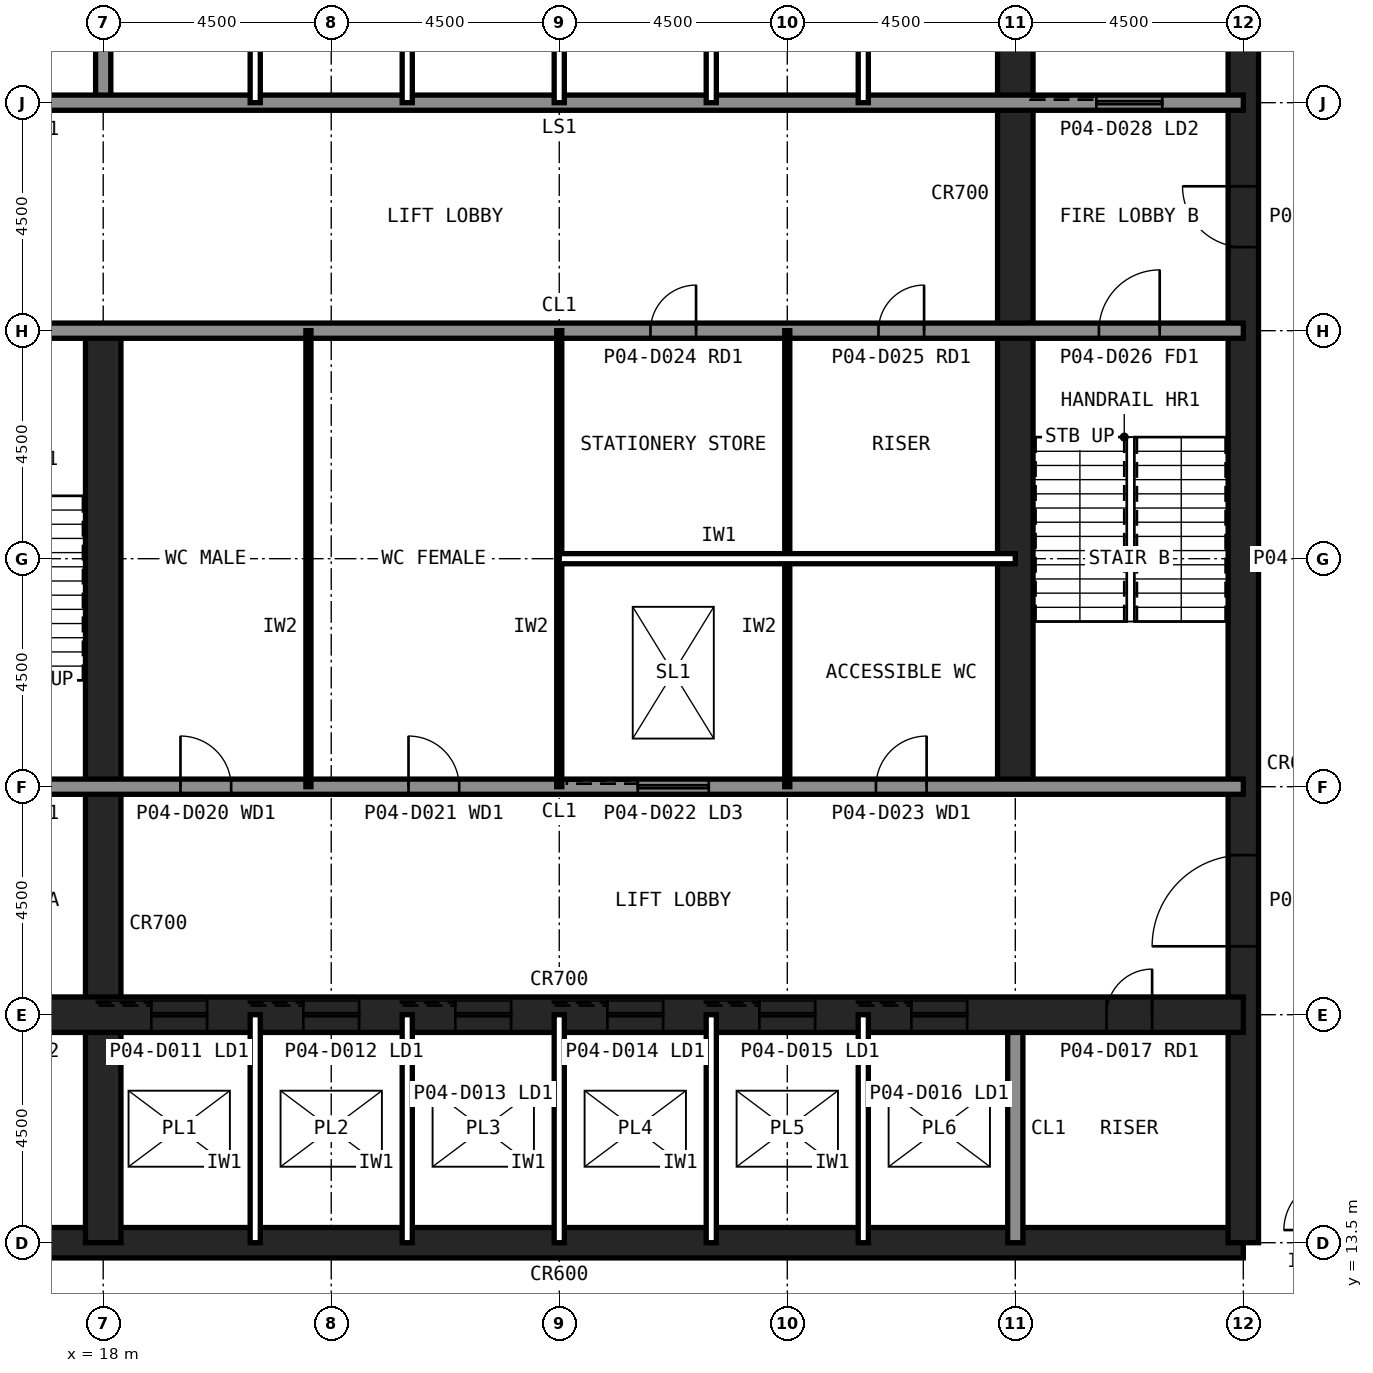
"""IFC4 building model, lengths in metres.
Left out: names, types, materials, properties, quantities, classifications, styles, units other than length and angle.
Written with IfcOpenShell. Run it as: python <this file> out.ifc"""

import sys

from ifc_helpers import new_model, si_unit, direction, frame, frame_2d, origin, place, context, subcontext, project, spatial, rectangle, extrude, element, fill, save


model = new_model("IFC4")
c1 = context("Model", 3, precision=1e-05, world=origin(), true_north=direction((0.0, 1.0)))
c2 = subcontext(c1, "Body", "Model", "MODEL_VIEW")
j1 = project(units=[si_unit("LENGTHUNIT", "METRE"), si_unit("PLANEANGLEUNIT", "RADIAN")], contexts=[c1])
p1 = place(None, origin())
s1 = spatial("IfcSite", under=j1, at=p1, CompositionType="ELEMENT")
p2 = place(p1, origin())
s2 = spatial("IfcBuilding", under=s1, at=p2, CompositionType="ELEMENT")
p3 = place(p2, frame((0.0, 0.0, 18.0)))
s3 = spatial("IfcBuildingStorey", under=s2, at=p3, CompositionType="ELEMENT", Elevation=18.0)
p4 = place(p3, frame((13.5, 13.5, 0.0), z_axis=(0.0, 0.0, 1.0), x_axis=(1.0, 0.0, 0.0)))
e1 = element("IfcWall", 1, at=p4, inside=s3, PredefinedType="SHEAR", context=c2, shape_type="SweptSolid", body=[
    extrude(rectangle(XDim=27.0, YDim=0.6, at=frame_2d((13.5, 0.0))), origin(), (0.0, 0.0, 1.0), 5.0),
])
p5 = place(p3, frame((40.5, 13.5, 0.0), z_axis=(0.0, 0.0, 1.0), x_axis=(0.0, 1.0, 0.0)))
e2 = element("IfcWall", 2, at=p5, inside=s3, PredefinedType="SHEAR", context=c2, shape_type="SweptSolid", body=[
    extrude(rectangle(XDim=27.0, YDim=0.6, at=frame_2d((13.5, 0.0))), origin(), (0.0, 0.0, 1.0), 5.0),
])
p6 = place(p5, frame((5.85, 0.0, 0.0)))
e3 = element("IfcOpeningElement", 3, at=p6, cuts=e2, PredefinedType="OPENING", context=c2, shape_type="SweptSolid", body=[
    extrude(rectangle(XDim=1.8, YDim=2.1, at=frame_2d((0.9, 1.05))), frame((0.0, 0.31, 0.0), z_axis=(0.0, -1.0, 0.0), x_axis=(1.0, 0.0, 0.0)), (0.0, 0.0, 1.0), 0.62),
])
p7 = place(p5, frame((19.65, 0.0, 0.0)))
e4 = element("IfcOpeningElement", 4, at=p7, cuts=e2, PredefinedType="OPENING", context=c2, shape_type="SweptSolid", body=[
    extrude(rectangle(XDim=1.2, YDim=2.1, at=frame_2d((0.6, 1.05))), frame((0.0, 0.31, 0.0), z_axis=(0.0, -1.0, 0.0), x_axis=(1.0, 0.0, 0.0)), (0.0, 0.0, 1.0), 0.62),
])
p8 = place(p3, frame((18.0, 13.5, 0.0), z_axis=(0.0, 0.0, 1.0), x_axis=(0.0, 1.0, 0.0)))
e5 = element("IfcWall", 5, at=p8, inside=s3, PredefinedType="SHEAR", context=c2, shape_type="SweptSolid", body=[
    extrude(rectangle(XDim=18.0, YDim=0.7, at=frame_2d((9.0, 0.0))), origin(), (0.0, 0.0, 1.0), 5.0),
])
for number, where, z_axis, x_axis in (
    (6, (18.0, 36.0, 0.0), (0.0, 0.0, 1.0), (0.0, 1.0, 0.0)),
    (7, (36.0, 13.5, 0.0), (0.0, 0.0, 1.0), (0.0, 1.0, 0.0)),
):
    element("IfcWall", number, at=place(p3, frame(where, z_axis=z_axis, x_axis=x_axis)), inside=s3, PredefinedType="SOLIDWALL", context=c2, shape_type="SweptSolid", body=[
        extrude(rectangle(XDim=4.5, YDim=0.3, at=frame_2d((2.25, 0.0))), origin(), (0.0, 0.0, 1.0), 4.8),
    ])
p9 = place(p3, frame((36.0, 22.5, 0.0), z_axis=(0.0, 0.0, 1.0), x_axis=(0.0, 1.0, 0.0)))
e8 = element("IfcWall", 8, at=p9, inside=s3, PredefinedType="SHEAR", context=c2, shape_type="SweptSolid", body=[
    extrude(rectangle(XDim=18.0, YDim=0.7, at=frame_2d((9.0, 0.0))), origin(), (0.0, 0.0, 1.0), 5.0),
])
p10 = place(p3, frame((13.5, 18.0, 0.0), z_axis=(0.0, 0.0, 1.0), x_axis=(1.0, 0.0, 0.0)))
e9 = element("IfcWall", 9, at=p10, inside=s3, PredefinedType="SHEAR", context=c2, shape_type="SweptSolid", body=[
    extrude(rectangle(XDim=27.0, YDim=0.7, at=frame_2d((13.5, 0.0))), origin(), (0.0, 0.0, 1.0), 5.0),
])
p11 = place(p10, frame((24.3, 0.0, 0.0)))
e10 = element("IfcOpeningElement", 10, at=p11, cuts=e9, PredefinedType="OPENING", context=c2, shape_type="SweptSolid", body=[
    extrude(rectangle(XDim=0.9, YDim=2.1, at=frame_2d((0.45, 1.05))), frame((0.0, 0.36, 0.0), z_axis=(0.0, -1.0, 0.0), x_axis=(1.0, 0.0, 0.0)), (0.0, 0.0, 1.0), 0.72),
])
p12 = place(p10, frame((5.45, 0.0, 0.0)))
e11 = element("IfcOpeningElement", 11, at=p12, cuts=e9, PredefinedType="OPENING", context=c2, shape_type="SweptSolid", body=[
    extrude(rectangle(XDim=1.1, YDim=2.1, at=frame_2d((0.55, 1.05))), frame((0.0, 0.36, 0.0), z_axis=(0.0, -1.0, 0.0), x_axis=(1.0, 0.0, 0.0)), (0.0, 0.0, 1.0), 0.72),
])
p13 = place(p10, frame((8.45, 0.0, 0.0)))
e12 = element("IfcOpeningElement", 12, at=p13, cuts=e9, PredefinedType="OPENING", context=c2, shape_type="SweptSolid", body=[
    extrude(rectangle(XDim=1.1, YDim=2.1, at=frame_2d((0.55, 1.05))), frame((0.0, 0.36, 0.0), z_axis=(0.0, -1.0, 0.0), x_axis=(1.0, 0.0, 0.0)), (0.0, 0.0, 1.0), 0.72),
])
p14 = place(p10, frame((11.45, 0.0, 0.0)))
e13 = element("IfcOpeningElement", 13, at=p14, cuts=e9, PredefinedType="OPENING", context=c2, shape_type="SweptSolid", body=[
    extrude(rectangle(XDim=1.1, YDim=2.1, at=frame_2d((0.55, 1.05))), frame((0.0, 0.36, 0.0), z_axis=(0.0, -1.0, 0.0), x_axis=(1.0, 0.0, 0.0)), (0.0, 0.0, 1.0), 0.72),
])
p15 = place(p10, frame((14.45, 0.0, 0.0)))
e14 = element("IfcOpeningElement", 14, at=p15, cuts=e9, PredefinedType="OPENING", context=c2, shape_type="SweptSolid", body=[
    extrude(rectangle(XDim=1.1, YDim=2.1, at=frame_2d((0.55, 1.05))), frame((0.0, 0.36, 0.0), z_axis=(0.0, -1.0, 0.0), x_axis=(1.0, 0.0, 0.0)), (0.0, 0.0, 1.0), 0.72),
])
p16 = place(p10, frame((17.45, 0.0, 0.0)))
e15 = element("IfcOpeningElement", 15, at=p16, cuts=e9, PredefinedType="OPENING", context=c2, shape_type="SweptSolid", body=[
    extrude(rectangle(XDim=1.1, YDim=2.1, at=frame_2d((0.55, 1.05))), frame((0.0, 0.36, 0.0), z_axis=(0.0, -1.0, 0.0), x_axis=(1.0, 0.0, 0.0)), (0.0, 0.0, 1.0), 0.72),
])
p17 = place(p10, frame((20.45, 0.0, 0.0)))
e16 = element("IfcOpeningElement", 16, at=p17, cuts=e9, PredefinedType="OPENING", context=c2, shape_type="SweptSolid", body=[
    extrude(rectangle(XDim=1.1, YDim=2.1, at=frame_2d((0.55, 1.05))), frame((0.0, 0.36, 0.0), z_axis=(0.0, -1.0, 0.0), x_axis=(1.0, 0.0, 0.0)), (0.0, 0.0, 1.0), 0.72),
])
p18 = place(p10, frame((1.6, 0.0, 0.0)))
e17 = element("IfcOpeningElement", 17, at=p18, cuts=e9, PredefinedType="OPENING", context=c2, shape_type="SweptSolid", body=[
    extrude(rectangle(XDim=1.3, YDim=2.2, at=frame_2d((0.65, 1.1))), frame((0.0, 0.36, 0.0), z_axis=(0.0, -1.0, 0.0), x_axis=(1.0, 0.0, 0.0)), (0.0, 0.0, 1.0), 0.72),
])
p19 = place(p3, frame((13.5, 36.0, 0.0), z_axis=(0.0, 0.0, 1.0), x_axis=(1.0, 0.0, 0.0)))
e18 = element("IfcWall", 18, at=p19, inside=s3, PredefinedType="SOLIDWALL", context=c2, shape_type="SweptSolid", body=[
    extrude(rectangle(XDim=27.0, YDim=0.3, at=frame_2d((13.5, 0.0))), origin(), (0.0, 0.0, 1.0), 4.8),
])
p20 = place(p19, frame((1.8, 0.0, 0.0)))
e19 = element("IfcOpeningElement", 19, at=p20, cuts=e18, PredefinedType="OPENING", context=c2, shape_type="SweptSolid", body=[
    extrude(rectangle(XDim=0.9, YDim=2.1, at=frame_2d((0.45, 1.05))), frame((0.0, 0.16, 0.0), z_axis=(0.0, -1.0, 0.0), x_axis=(1.0, 0.0, 0.0)), (0.0, 0.0, 1.0), 0.32),
])
p21 = place(p19, frame((24.1, 0.0, 0.0)))
e20 = element("IfcOpeningElement", 20, at=p21, cuts=e18, PredefinedType="OPENING", context=c2, shape_type="SweptSolid", body=[
    extrude(rectangle(XDim=1.3, YDim=2.2, at=frame_2d((0.65, 1.1))), frame((0.0, 0.16, 0.0), z_axis=(0.0, -1.0, 0.0), x_axis=(1.0, 0.0, 0.0)), (0.0, 0.0, 1.0), 0.32),
])
p22 = place(p3, frame((13.5, 22.5, 0.0), z_axis=(0.0, 0.0, 1.0), x_axis=(1.0, 0.0, 0.0)))
e21 = element("IfcWall", 21, at=p22, inside=s3, PredefinedType="SOLIDWALL", context=c2, shape_type="SweptSolid", body=[
    extrude(rectangle(XDim=27.0, YDim=0.3, at=frame_2d((13.5, 0.0))), origin(), (0.0, 0.0, 1.0), 4.8),
])
p23 = place(p22, frame((1.65, 0.0, 0.0)))
e22 = element("IfcOpeningElement", 22, at=p23, cuts=e21, PredefinedType="OPENING", context=c2, shape_type="SweptSolid", body=[
    extrude(rectangle(XDim=1.2, YDim=2.1, at=frame_2d((0.6, 1.05))), frame((0.0, 0.16, 0.0), z_axis=(0.0, -1.0, 0.0), x_axis=(1.0, 0.0, 0.0)), (0.0, 0.0, 1.0), 0.32),
])
p24 = place(p22, frame((6.025, 0.0, 0.0)))
e23 = element("IfcOpeningElement", 23, at=p24, cuts=e21, PredefinedType="OPENING", context=c2, shape_type="SweptSolid", body=[
    extrude(rectangle(XDim=1.0, YDim=2.1, at=frame_2d((0.5, 1.05))), frame((0.0, 0.16, 0.0), z_axis=(0.0, -1.0, 0.0), x_axis=(1.0, 0.0, 0.0)), (0.0, 0.0, 1.0), 0.32),
])
p25 = place(p22, frame((10.525, 0.0, 0.0)))
e24 = element("IfcOpeningElement", 24, at=p25, cuts=e21, PredefinedType="OPENING", context=c2, shape_type="SweptSolid", body=[
    extrude(rectangle(XDim=1.0, YDim=2.1, at=frame_2d((0.5, 1.05))), frame((0.0, 0.16, 0.0), z_axis=(0.0, -1.0, 0.0), x_axis=(1.0, 0.0, 0.0)), (0.0, 0.0, 1.0), 0.32),
])
p26 = place(p22, frame((19.75, 0.0, 0.0)))
e25 = element("IfcOpeningElement", 25, at=p26, cuts=e21, PredefinedType="OPENING", context=c2, shape_type="SweptSolid", body=[
    extrude(rectangle(XDim=1.0, YDim=2.1, at=frame_2d((0.5, 1.05))), frame((0.0, 0.16, 0.0), z_axis=(0.0, -1.0, 0.0), x_axis=(1.0, 0.0, 0.0)), (0.0, 0.0, 1.0), 0.32),
])
p27 = place(p22, frame((15.05, 0.0, 0.0)))
e26 = element("IfcOpeningElement", 26, at=p27, cuts=e21, PredefinedType="OPENING", context=c2, shape_type="SweptSolid", body=[
    extrude(rectangle(XDim=1.4, YDim=2.4, at=frame_2d((0.7, 1.2))), frame((0.0, 0.16, 0.0), z_axis=(0.0, -1.0, 0.0), x_axis=(1.0, 0.0, 0.0)), (0.0, 0.0, 1.0), 0.32),
])
p28 = place(p3, frame((13.5, 31.5, 0.0), z_axis=(0.0, 0.0, 1.0), x_axis=(1.0, 0.0, 0.0)))
e27 = element("IfcWall", 27, at=p28, inside=s3, PredefinedType="SOLIDWALL", context=c2, shape_type="SweptSolid", body=[
    extrude(rectangle(XDim=27.0, YDim=0.3, at=frame_2d((13.5, 0.0))), origin(), (0.0, 0.0, 1.0), 4.8),
])
p29 = place(p28, frame((24.15, 0.0, 0.0)))
e28 = element("IfcOpeningElement", 28, at=p29, cuts=e27, PredefinedType="OPENING", context=c2, shape_type="SweptSolid", body=[
    extrude(rectangle(XDim=1.2, YDim=2.1, at=frame_2d((0.6, 1.05))), frame((0.0, 0.16, 0.0), z_axis=(0.0, -1.0, 0.0), x_axis=(1.0, 0.0, 0.0)), (0.0, 0.0, 1.0), 0.32),
])
p30 = place(p28, frame((15.3, 0.0, 0.0)))
e29 = element("IfcOpeningElement", 29, at=p30, cuts=e27, PredefinedType="OPENING", context=c2, shape_type="SweptSolid", body=[
    extrude(rectangle(XDim=0.9, YDim=2.1, at=frame_2d((0.45, 1.05))), frame((0.0, 0.16, 0.0), z_axis=(0.0, -1.0, 0.0), x_axis=(1.0, 0.0, 0.0)), (0.0, 0.0, 1.0), 0.32),
])
p31 = place(p28, frame((19.8, 0.0, 0.0)))
e30 = element("IfcOpeningElement", 30, at=p31, cuts=e27, PredefinedType="OPENING", context=c2, shape_type="SweptSolid", body=[
    extrude(rectangle(XDim=0.9, YDim=2.1, at=frame_2d((0.45, 1.05))), frame((0.0, 0.16, 0.0), z_axis=(0.0, -1.0, 0.0), x_axis=(1.0, 0.0, 0.0)), (0.0, 0.0, 1.0), 0.32),
])
for number, where, z_axis, x_axis in (
    (31, (21.0, 13.5, 0.0), (0.0, 0.0, 1.0), (0.0, 1.0, 0.0)),
    (32, (21.0, 36.0, 0.0), (0.0, 0.0, 1.0), (0.0, 1.0, 0.0)),
    (33, (24.0, 13.5, 0.0), (0.0, 0.0, 1.0), (0.0, 1.0, 0.0)),
    (34, (24.0, 36.0, 0.0), (0.0, 0.0, 1.0), (0.0, 1.0, 0.0)),
    (35, (27.0, 13.5, 0.0), (0.0, 0.0, 1.0), (0.0, 1.0, 0.0)),
    (36, (27.0, 36.0, 0.0), (0.0, 0.0, 1.0), (0.0, 1.0, 0.0)),
    (37, (30.0, 13.5, 0.0), (0.0, 0.0, 1.0), (0.0, 1.0, 0.0)),
    (38, (30.0, 36.0, 0.0), (0.0, 0.0, 1.0), (0.0, 1.0, 0.0)),
    (39, (33.0, 13.5, 0.0), (0.0, 0.0, 1.0), (0.0, 1.0, 0.0)),
    (40, (33.0, 36.0, 0.0), (0.0, 0.0, 1.0), (0.0, 1.0, 0.0)),
):
    element("IfcWall", number, at=place(p3, frame(where, z_axis=z_axis, x_axis=x_axis)), inside=s3, PredefinedType="PARTITIONING", context=c2, shape_type="SweptSolid", body=[
        extrude(rectangle(XDim=4.5, YDim=0.2, at=frame_2d((2.25, 0.0))), origin(), (0.0, 0.0, 1.0), 4.8),
    ])
for number, where, z_axis, x_axis in (
    (41, (22.05, 22.5, 0.0), (0.0, 0.0, 1.0), (0.0, 1.0, 0.0)),
    (42, (27.0, 22.5, 0.0), (0.0, 0.0, 1.0), (0.0, 1.0, 0.0)),
    (43, (31.5, 22.5, 0.0), (0.0, 0.0, 1.0), (0.0, 1.0, 0.0)),
):
    element("IfcWall", number, at=place(p3, frame(where, z_axis=z_axis, x_axis=x_axis)), inside=s3, PredefinedType="PLUMBINGWALL", context=c2, shape_type="SweptSolid", body=[
        extrude(rectangle(XDim=9.0, YDim=0.1, at=frame_2d((4.5, 0.0))), origin(), (0.0, 0.0, 1.0), 4.8),
    ])
p32 = place(p3, frame((27.0, 27.0, 0.0), z_axis=(0.0, 0.0, 1.0), x_axis=(1.0, 0.0, 0.0)))
e44 = element("IfcWall", 44, at=p32, inside=s3, PredefinedType="PARTITIONING", context=c2, shape_type="SweptSolid", body=[
    extrude(rectangle(XDim=9.0, YDim=0.2, at=frame_2d((4.5, 0.0))), origin(), (0.0, 0.0, 1.0), 4.8),
])
p33 = place(p6, origin())
e45 = element("IfcDoor", 45, at=p33, inside=s3, OperationType="SINGLE_SWING_LEFT", PredefinedType="DOOR", context=c2, shape_type="SweptSolid", body=[
    extrude(rectangle(XDim=1.8, YDim=2.1, at=frame_2d((0.9, 1.05))), frame((0.0, 0.025, 0.0), z_axis=(0.0, -1.0, 0.0), x_axis=(1.0, 0.0, 0.0)), (0.0, 0.0, 1.0), 0.05),
])
fill(e3, e45)
p34 = place(p7, origin())
e46 = element("IfcDoor", 46, at=p34, inside=s3, OperationType="SINGLE_SWING_RIGHT", PredefinedType="DOOR", context=c2, shape_type="SweptSolid", body=[
    extrude(rectangle(XDim=1.2, YDim=2.1, at=frame_2d((0.6, 1.05))), frame((0.0, 0.025, 0.0), z_axis=(0.0, -1.0, 0.0), x_axis=(1.0, 0.0, 0.0)), (0.0, 0.0, 1.0), 0.05),
])
fill(e4, e46)
p35 = place(p29, origin())
e47 = element("IfcDoor", 47, at=p35, inside=s3, OperationType="SINGLE_SWING_RIGHT", PredefinedType="DOOR", context=c2, shape_type="SweptSolid", body=[
    extrude(rectangle(XDim=1.2, YDim=2.1, at=frame_2d((0.6, 1.05))), frame((0.0, 0.025, 0.0), z_axis=(0.0, -1.0, 0.0), x_axis=(1.0, 0.0, 0.0)), (0.0, 0.0, 1.0), 0.05),
])
fill(e28, e47)
p36 = place(p24, origin())
e48 = element("IfcDoor", 48, at=p36, inside=s3, OperationType="SINGLE_SWING_LEFT", PredefinedType="DOOR", context=c2, shape_type="SweptSolid", body=[
    extrude(rectangle(XDim=1.0, YDim=2.1, at=frame_2d((0.5, 1.05))), frame((0.0, 0.025, 0.0), z_axis=(0.0, -1.0, 0.0), x_axis=(1.0, 0.0, 0.0)), (0.0, 0.0, 1.0), 0.05),
])
fill(e23, e48)
p37 = place(p25, origin())
e49 = element("IfcDoor", 49, at=p37, inside=s3, OperationType="SINGLE_SWING_LEFT", PredefinedType="DOOR", context=c2, shape_type="SweptSolid", body=[
    extrude(rectangle(XDim=1.0, YDim=2.1, at=frame_2d((0.5, 1.05))), frame((0.0, 0.025, 0.0), z_axis=(0.0, -1.0, 0.0), x_axis=(1.0, 0.0, 0.0)), (0.0, 0.0, 1.0), 0.05),
])
fill(e24, e49)
p38 = place(p26, origin())
e50 = element("IfcDoor", 50, at=p38, inside=s3, OperationType="SINGLE_SWING_RIGHT", PredefinedType="DOOR", context=c2, shape_type="SweptSolid", body=[
    extrude(rectangle(XDim=1.0, YDim=2.1, at=frame_2d((0.5, 1.05))), frame((0.0, 0.025, 0.0), z_axis=(0.0, -1.0, 0.0), x_axis=(1.0, 0.0, 0.0)), (0.0, 0.0, 1.0), 0.05),
])
fill(e25, e50)
p39 = place(p30, origin())
e51 = element("IfcDoor", 51, at=p39, inside=s3, OperationType="SINGLE_SWING_RIGHT", PredefinedType="DOOR", context=c2, shape_type="SweptSolid", body=[
    extrude(rectangle(XDim=0.9, YDim=2.1, at=frame_2d((0.45, 1.05))), frame((0.0, 0.025, 0.0), z_axis=(0.0, -1.0, 0.0), x_axis=(1.0, 0.0, 0.0)), (0.0, 0.0, 1.0), 0.05),
])
fill(e29, e51)
p40 = place(p31, origin())
e52 = element("IfcDoor", 52, at=p40, inside=s3, OperationType="SINGLE_SWING_RIGHT", PredefinedType="DOOR", context=c2, shape_type="SweptSolid", body=[
    extrude(rectangle(XDim=0.9, YDim=2.1, at=frame_2d((0.45, 1.05))), frame((0.0, 0.025, 0.0), z_axis=(0.0, -1.0, 0.0), x_axis=(1.0, 0.0, 0.0)), (0.0, 0.0, 1.0), 0.05),
])
fill(e30, e52)
p41 = place(p11, origin())
e53 = element("IfcDoor", 53, at=p41, inside=s3, OperationType="SINGLE_SWING_RIGHT", PredefinedType="DOOR", context=c2, shape_type="SweptSolid", body=[
    extrude(rectangle(XDim=0.9, YDim=2.1, at=frame_2d((0.45, 1.05))), frame((0.0, 0.025, 0.0), z_axis=(0.0, -1.0, 0.0), x_axis=(1.0, 0.0, 0.0)), (0.0, 0.0, 1.0), 0.05),
])
fill(e10, e53)
p42 = place(p12, origin())
e54 = element("IfcDoor", 54, at=p42, inside=s3, OperationType="SLIDING_TO_LEFT", PredefinedType="DOOR", context=c2, shape_type="SweptSolid", body=[
    extrude(rectangle(XDim=1.1, YDim=2.1, at=frame_2d((0.55, 1.05))), frame((0.0, 0.025, 0.0), z_axis=(0.0, -1.0, 0.0), x_axis=(1.0, 0.0, 0.0)), (0.0, 0.0, 1.0), 0.05),
])
fill(e11, e54)
p43 = place(p13, origin())
e55 = element("IfcDoor", 55, at=p43, inside=s3, OperationType="SLIDING_TO_LEFT", PredefinedType="DOOR", context=c2, shape_type="SweptSolid", body=[
    extrude(rectangle(XDim=1.1, YDim=2.1, at=frame_2d((0.55, 1.05))), frame((0.0, 0.025, 0.0), z_axis=(0.0, -1.0, 0.0), x_axis=(1.0, 0.0, 0.0)), (0.0, 0.0, 1.0), 0.05),
])
fill(e12, e55)
p44 = place(p14, origin())
e56 = element("IfcDoor", 56, at=p44, inside=s3, OperationType="SLIDING_TO_LEFT", PredefinedType="DOOR", context=c2, shape_type="SweptSolid", body=[
    extrude(rectangle(XDim=1.1, YDim=2.1, at=frame_2d((0.55, 1.05))), frame((0.0, 0.025, 0.0), z_axis=(0.0, -1.0, 0.0), x_axis=(1.0, 0.0, 0.0)), (0.0, 0.0, 1.0), 0.05),
])
fill(e13, e56)
p45 = place(p15, origin())
e57 = element("IfcDoor", 57, at=p45, inside=s3, OperationType="SLIDING_TO_LEFT", PredefinedType="DOOR", context=c2, shape_type="SweptSolid", body=[
    extrude(rectangle(XDim=1.1, YDim=2.1, at=frame_2d((0.55, 1.05))), frame((0.0, 0.025, 0.0), z_axis=(0.0, -1.0, 0.0), x_axis=(1.0, 0.0, 0.0)), (0.0, 0.0, 1.0), 0.05),
])
fill(e14, e57)
p46 = place(p16, origin())
e58 = element("IfcDoor", 58, at=p46, inside=s3, OperationType="SLIDING_TO_LEFT", PredefinedType="DOOR", context=c2, shape_type="SweptSolid", body=[
    extrude(rectangle(XDim=1.1, YDim=2.1, at=frame_2d((0.55, 1.05))), frame((0.0, 0.025, 0.0), z_axis=(0.0, -1.0, 0.0), x_axis=(1.0, 0.0, 0.0)), (0.0, 0.0, 1.0), 0.05),
])
fill(e15, e58)
p47 = place(p17, origin())
e59 = element("IfcDoor", 59, at=p47, inside=s3, OperationType="SLIDING_TO_LEFT", PredefinedType="DOOR", context=c2, shape_type="SweptSolid", body=[
    extrude(rectangle(XDim=1.1, YDim=2.1, at=frame_2d((0.55, 1.05))), frame((0.0, 0.025, 0.0), z_axis=(0.0, -1.0, 0.0), x_axis=(1.0, 0.0, 0.0)), (0.0, 0.0, 1.0), 0.05),
])
fill(e16, e59)
p48 = place(p21, origin())
e60 = element("IfcDoor", 60, at=p48, inside=s3, OperationType="SLIDING_TO_LEFT", PredefinedType="DOOR", context=c2, shape_type="SweptSolid", body=[
    extrude(rectangle(XDim=1.3, YDim=2.2, at=frame_2d((0.65, 1.1))), frame((0.0, 0.025, 0.0), z_axis=(0.0, -1.0, 0.0), x_axis=(1.0, 0.0, 0.0)), (0.0, 0.0, 1.0), 0.05),
])
fill(e20, e60)
p49 = place(p27, origin())
e61 = element("IfcDoor", 61, at=p49, inside=s3, OperationType="SLIDING_TO_LEFT", PredefinedType="DOOR", context=c2, shape_type="SweptSolid", body=[
    extrude(rectangle(XDim=1.4, YDim=2.4, at=frame_2d((0.7, 1.2))), frame((0.0, 0.025, 0.0), z_axis=(0.0, -1.0, 0.0), x_axis=(1.0, 0.0, 0.0)), (0.0, 0.0, 1.0), 0.05),
])
fill(e26, e61)
save(model, sys.argv[1])
